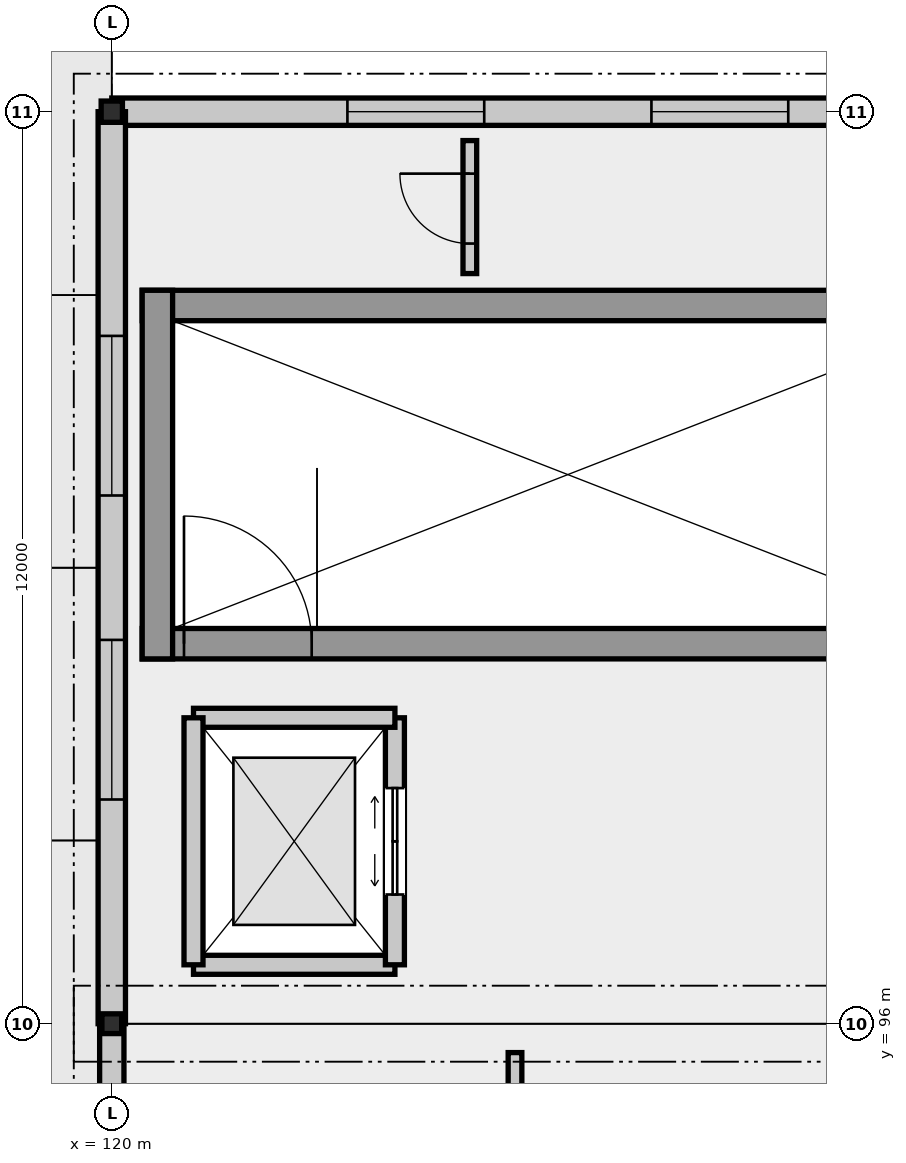
"""IFC4 building model, lengths in metres.
Left out: names, types, materials, properties, quantities, classifications, styles, units other than length and angle.
Written with IfcOpenShell. Run it as: python <this file> out.ifc"""

import sys

from ifc_helpers import new_model, si_unit, direction, frame, frame_2d, origin, origin_2d, place, context, subcontext, project, spatial, rectangle, i_section, extrude, element, fill, save


model = new_model("IFC4")
c1 = context("Model", 3, precision=1e-05, world=origin(), true_north=direction((0.0, 1.0)))
c2 = subcontext(c1, "Body", "Model", "MODEL_VIEW")
j1 = project(units=[si_unit("LENGTHUNIT", "METRE"), si_unit("PLANEANGLEUNIT", "RADIAN")], contexts=[c1])
p1 = place(None, origin())
s1 = spatial("IfcSite", under=j1, at=p1, CompositionType="ELEMENT")
p2 = place(p1, origin())
s2 = spatial("IfcBuilding", under=s1, at=p2, CompositionType="ELEMENT")
p3 = place(p2, frame((0.0, 0.0, 23.4)))
s3 = spatial("IfcBuildingStorey", under=s2, at=p3, CompositionType="ELEMENT", Elevation=23.4)
p4 = place(p3, frame((120.0, 96.0, 0.0), z_axis=(0.0, 0.0, 1.0), x_axis=(1.0, 0.0, 0.0)))
e1 = element("IfcColumn", 1, at=p4, inside=s3, PredefinedType="COLUMN", context=c2, shape_type="SweptSolid", body=[
    extrude(i_section(OverallWidth=0.26, OverallDepth=0.26, WebThickness=0.01, FlangeThickness=0.018, FilletRadius=0.024, at=origin_2d()), origin(), (0.0, 0.0, 1.0), 4.8),
])
p5 = place(p3, frame((120.0, 108.0, 0.0), z_axis=(0.0, 0.0, 1.0), x_axis=(1.0, 0.0, 0.0)))
e2 = element("IfcColumn", 2, at=p5, inside=s3, PredefinedType="COLUMN", context=c2, shape_type="SweptSolid", body=[
    extrude(i_section(OverallWidth=0.28, OverallDepth=0.28, WebThickness=0.01, FlangeThickness=0.018, FilletRadius=0.024, at=origin_2d()), origin(), (0.0, 0.0, 1.0), 4.8),
])
p6 = place(p3, frame((120.0, 96.0, 0.0), z_axis=(0.0, 0.0, 1.0), x_axis=(0.0, -1.0, 0.0)))
e3 = element("IfcWall", 3, at=p6, inside=s3, PredefinedType="SOLIDWALL", context=c2, shape_type="SweptSolid", body=[
    extrude(rectangle(XDim=12.0, YDim=0.32, at=frame_2d((6.0, 0.0))), origin(), (0.0, 0.0, 1.0), 3.98),
])
p7 = place(p6, frame((3.175, 0.0, 0.95)))
e4 = element("IfcOpeningElement", 4, at=p7, cuts=e3, PredefinedType="OPENING", context=c2, shape_type="SweptSolid", body=[
    extrude(rectangle(XDim=1.65, YDim=2.1, at=frame_2d((0.825, 1.05))), frame((0.0, 0.17, 0.0), z_axis=(0.0, -1.0, 0.0), x_axis=(1.0, 0.0, 0.0)), (0.0, 0.0, 1.0), 0.34),
])
p8 = place(p6, frame((7.175, 0.0, 0.95)))
e5 = element("IfcOpeningElement", 5, at=p8, cuts=e3, PredefinedType="OPENING", context=c2, shape_type="SweptSolid", body=[
    extrude(rectangle(XDim=1.65, YDim=2.1, at=frame_2d((0.825, 1.05))), frame((0.0, 0.17, 0.0), z_axis=(0.0, -1.0, 0.0), x_axis=(1.0, 0.0, 0.0)), (0.0, 0.0, 1.0), 0.34),
])
p9 = place(p3, frame((132.0, 108.0, 0.0), z_axis=(0.0, 0.0, 1.0), x_axis=(-1.0, 0.0, 0.0)))
e6 = element("IfcWall", 6, at=p9, inside=s3, PredefinedType="SOLIDWALL", context=c2, shape_type="SweptSolid", body=[
    extrude(rectangle(XDim=12.0, YDim=0.36, at=frame_2d((6.0, 0.0))), origin(), (0.0, 0.0, 1.0), 3.98),
])
p10 = place(p9, frame((3.1, 0.0, 0.95)))
e7 = element("IfcOpeningElement", 7, at=p10, cuts=e6, PredefinedType="OPENING", context=c2, shape_type="SweptSolid", body=[
    extrude(rectangle(XDim=1.8, YDim=2.1, at=frame_2d((0.9, 1.05))), frame((0.0, 0.19, 0.0), z_axis=(0.0, -1.0, 0.0), x_axis=(1.0, 0.0, 0.0)), (0.0, 0.0, 1.0), 0.38),
])
p11 = place(p9, frame((7.1, 0.0, 0.95)))
e8 = element("IfcOpeningElement", 8, at=p11, cuts=e6, PredefinedType="OPENING", context=c2, shape_type="SweptSolid", body=[
    extrude(rectangle(XDim=1.8, YDim=2.1, at=frame_2d((0.9, 1.05))), frame((0.0, 0.19, 0.0), z_axis=(0.0, -1.0, 0.0), x_axis=(1.0, 0.0, 0.0)), (0.0, 0.0, 1.0), 0.38),
])
p12 = place(p3, frame((120.0, 108.0, 0.0), z_axis=(0.0, 0.0, 1.0), x_axis=(0.0, -1.0, 0.0)))
e9 = element("IfcWall", 9, at=p12, inside=s3, PredefinedType="SOLIDWALL", context=c2, shape_type="SweptSolid", body=[
    extrude(rectangle(XDim=12.0, YDim=0.36, at=frame_2d((6.0, 0.0))), origin(), (0.0, 0.0, 1.0), 3.98),
])
p13 = place(p12, frame((2.95, 0.0, 0.95)))
e10 = element("IfcOpeningElement", 10, at=p13, cuts=e9, PredefinedType="OPENING", context=c2, shape_type="SweptSolid", body=[
    extrude(rectangle(XDim=2.1, YDim=2.1, at=frame_2d((1.05, 1.05))), frame((0.0, 0.19, 0.0), z_axis=(0.0, -1.0, 0.0), x_axis=(1.0, 0.0, 0.0)), (0.0, 0.0, 1.0), 0.38),
])
p14 = place(p12, frame((6.95, 0.0, 0.95)))
e11 = element("IfcOpeningElement", 11, at=p14, cuts=e9, PredefinedType="OPENING", context=c2, shape_type="SweptSolid", body=[
    extrude(rectangle(XDim=2.1, YDim=2.1, at=frame_2d((1.05, 1.05))), frame((0.0, 0.19, 0.0), z_axis=(0.0, -1.0, 0.0), x_axis=(1.0, 0.0, 0.0)), (0.0, 0.0, 1.0), 0.38),
])
p15 = place(p3, frame((120.4, 101.0, 0.0), z_axis=(0.0, 0.0, 1.0), x_axis=(1.0, 0.0, 0.0)))
e12 = element("IfcWall", 12, at=p15, inside=s3, PredefinedType="SHEAR", context=c2, shape_type="SweptSolid", body=[
    extrude(rectangle(XDim=11.2, YDim=0.4, at=frame_2d((5.6, 0.0))), origin(), (0.0, 0.0, 1.0), 4.56),
])
p16 = place(p15, frame((0.55, 0.0, 0.0)))
e13 = element("IfcOpeningElement", 13, at=p16, cuts=e12, PredefinedType="OPENING", context=c2, shape_type="SweptSolid", body=[
    extrude(rectangle(XDim=1.68, YDim=2.35, at=frame_2d((0.84, 1.175))), frame((0.0, 0.21, 0.0), z_axis=(0.0, -1.0, 0.0), x_axis=(1.0, 0.0, 0.0)), (0.0, 0.0, 1.0), 0.42),
])
p17 = place(p3, frame((131.6, 105.45, 0.0), z_axis=(0.0, 0.0, 1.0), x_axis=(-1.0, 0.0, 0.0)))
e14 = element("IfcWall", 14, at=p17, inside=s3, PredefinedType="SHEAR", context=c2, shape_type="SweptSolid", body=[
    extrude(rectangle(XDim=11.2, YDim=0.4, at=frame_2d((5.6, 0.0))), origin(), (0.0, 0.0, 1.0), 4.56),
])
p18 = place(p3, frame((120.6, 105.65, 0.0), z_axis=(0.0, 0.0, 1.0), x_axis=(0.0, -1.0, 0.0)))
e15 = element("IfcWall", 15, at=p18, inside=s3, PredefinedType="SHEAR", context=c2, shape_type="SweptSolid", body=[
    extrude(rectangle(XDim=4.85, YDim=0.4, at=frame_2d((2.425, 0.0))), origin(), (0.0, 0.0, 1.0), 4.56),
])
p19 = place(p3, frame((121.075, 96.775, 0.0), z_axis=(0.0, 0.0, 1.0), x_axis=(1.0, 0.0, 0.0)))
e16 = element("IfcWall", 16, at=p19, inside=s3, PredefinedType="SOLIDWALL", context=c2, shape_type="SweptSolid", body=[
    extrude(rectangle(XDim=2.65, YDim=0.25, at=frame_2d((1.325, 0.0))), origin(), (0.0, 0.0, 1.0), 4.54),
])
p20 = place(p3, frame((123.725, 96.775, 0.0), z_axis=(0.0, 0.0, 1.0), x_axis=(0.0, 1.0, 0.0)))
e17 = element("IfcWall", 17, at=p20, inside=s3, PredefinedType="SOLIDWALL", context=c2, shape_type="SweptSolid", body=[
    extrude(rectangle(XDim=3.25, YDim=0.25, at=frame_2d((1.625, 0.0))), origin(), (0.0, 0.0, 1.0), 4.54),
])
p21 = place(p20, frame((0.925, 0.0, 0.0)))
e18 = element("IfcOpeningElement", 18, at=p21, cuts=e17, PredefinedType="OPENING", context=c2, shape_type="SweptSolid", body=[
    extrude(rectangle(XDim=1.4, YDim=2.3, at=frame_2d((0.7, 1.15))), frame((0.0, 0.135, 0.0), z_axis=(0.0, -1.0, 0.0), x_axis=(1.0, 0.0, 0.0)), (0.0, 0.0, 1.0), 0.27),
])
p22 = place(p3, frame((123.725, 100.025, 0.0), z_axis=(0.0, 0.0, 1.0), x_axis=(-1.0, 0.0, 0.0)))
e19 = element("IfcWall", 19, at=p22, inside=s3, PredefinedType="SOLIDWALL", context=c2, shape_type="SweptSolid", body=[
    extrude(rectangle(XDim=2.65, YDim=0.25, at=frame_2d((1.325, 0.0))), origin(), (0.0, 0.0, 1.0), 4.54),
])
p23 = place(p3, frame((121.075, 100.025, 0.0), z_axis=(0.0, 0.0, 1.0), x_axis=(0.0, -1.0, 0.0)))
e20 = element("IfcWall", 20, at=p23, inside=s3, PredefinedType="SOLIDWALL", context=c2, shape_type="SweptSolid", body=[
    extrude(rectangle(XDim=3.25, YDim=0.25, at=frame_2d((1.625, 0.0))), origin(), (0.0, 0.0, 1.0), 4.54),
])
p24 = place(p3, frame((125.305, 93.87, 0.0), z_axis=(0.0, 0.0, 1.0), x_axis=(0.0, 1.0, 0.0)))
e21 = element("IfcWall", 21, at=p24, inside=s3, PredefinedType="PARTITIONING", context=c2, shape_type="SweptSolid", body=[
    extrude(rectangle(XDim=1.75, YDim=0.18, at=frame_2d((0.875, 0.0))), origin(), (0.0, 0.0, 1.0), 4.14),
])
p25 = place(p24, frame((0.395, 0.0, 0.0)))
e22 = element("IfcOpeningElement", 22, at=p25, cuts=e21, PredefinedType="OPENING", context=c2, shape_type="SweptSolid", body=[
    extrude(rectangle(XDim=0.92, YDim=2.15, at=frame_2d((0.46, 1.075))), frame((0.0, 0.1, 0.0), z_axis=(0.0, -1.0, 0.0), x_axis=(1.0, 0.0, 0.0)), (0.0, 0.0, 1.0), 0.2),
])
p26 = place(p3, frame((124.711, 105.87, 0.0), z_axis=(0.0, 0.0, 1.0), x_axis=(0.0, 1.0, 0.0)))
e23 = element("IfcWall", 23, at=p26, inside=s3, PredefinedType="PARTITIONING", context=c2, shape_type="SweptSolid", body=[
    extrude(rectangle(XDim=1.75, YDim=0.18, at=frame_2d((0.875, 0.0))), origin(), (0.0, 0.0, 1.0), 4.54),
])
p27 = place(p26, frame((0.395, 0.0, 0.0)))
e24 = element("IfcOpeningElement", 24, at=p27, cuts=e23, PredefinedType="OPENING", context=c2, shape_type="SweptSolid", body=[
    extrude(rectangle(XDim=0.92, YDim=2.15, at=frame_2d((0.46, 1.075))), frame((0.0, 0.1, 0.0), z_axis=(0.0, -1.0, 0.0), x_axis=(1.0, 0.0, 0.0)), (0.0, 0.0, 1.0), 0.2),
])
p28 = place(p10, origin())
e25 = element("IfcWindow", 25, at=p28, inside=s3, PartitioningType="SINGLE_PANEL", PredefinedType="WINDOW", context=c2, shape_type="SweptSolid", body=[
    extrude(rectangle(XDim=1.8, YDim=2.1, at=frame_2d((0.9, 1.05))), frame((0.0, 0.03, 0.0), z_axis=(0.0, -1.0, 0.0), x_axis=(1.0, 0.0, 0.0)), (0.0, 0.0, 1.0), 0.06),
])
fill(e7, e25)
p29 = place(p11, origin())
e26 = element("IfcWindow", 26, at=p29, inside=s3, PartitioningType="SINGLE_PANEL", PredefinedType="WINDOW", context=c2, shape_type="SweptSolid", body=[
    extrude(rectangle(XDim=1.8, YDim=2.1, at=frame_2d((0.9, 1.05))), frame((0.0, 0.03, 0.0), z_axis=(0.0, -1.0, 0.0), x_axis=(1.0, 0.0, 0.0)), (0.0, 0.0, 1.0), 0.06),
])
fill(e8, e26)
p30 = place(p13, origin())
e27 = element("IfcWindow", 27, at=p30, inside=s3, PartitioningType="SINGLE_PANEL", PredefinedType="WINDOW", context=c2, shape_type="SweptSolid", body=[
    extrude(rectangle(XDim=2.1, YDim=2.1, at=frame_2d((1.05, 1.05))), frame((0.0, 0.03, 0.0), z_axis=(0.0, -1.0, 0.0), x_axis=(1.0, 0.0, 0.0)), (0.0, 0.0, 1.0), 0.06),
])
fill(e10, e27)
p31 = place(p14, origin())
e28 = element("IfcWindow", 28, at=p31, inside=s3, PartitioningType="SINGLE_PANEL", PredefinedType="WINDOW", context=c2, shape_type="SweptSolid", body=[
    extrude(rectangle(XDim=2.1, YDim=2.1, at=frame_2d((1.05, 1.05))), frame((0.0, 0.03, 0.0), z_axis=(0.0, -1.0, 0.0), x_axis=(1.0, 0.0, 0.0)), (0.0, 0.0, 1.0), 0.06),
])
fill(e11, e28)
p32 = place(p16, origin())
e29 = element("IfcDoor", 29, at=p32, inside=s3, OperationType="DOUBLE_DOOR_SINGLE_SWING", PredefinedType="DOOR", context=c2, shape_type="SweptSolid", body=[
    extrude(rectangle(XDim=1.68, YDim=2.35, at=frame_2d((0.84, 1.175))), frame((0.0, 0.025, 0.0), z_axis=(0.0, -1.0, 0.0), x_axis=(1.0, 0.0, 0.0)), (0.0, 0.0, 1.0), 0.05),
])
fill(e13, e29)
p33 = place(p21, origin())
e30 = element("IfcDoor", 30, at=p33, inside=s3, OperationType="SLIDING_TO_LEFT", PredefinedType="DOOR", context=c2, shape_type="SweptSolid", body=[
    extrude(rectangle(XDim=1.4, YDim=2.3, at=frame_2d((0.7, 1.15))), frame((0.0, 0.025, 0.0), z_axis=(0.0, -1.0, 0.0), x_axis=(1.0, 0.0, 0.0)), (0.0, 0.0, 1.0), 0.05),
])
fill(e18, e30)
p34 = place(p27, origin())
e31 = element("IfcDoor", 31, at=p34, inside=s3, OperationType="SINGLE_SWING_RIGHT", PredefinedType="DOOR", context=c2, shape_type="SweptSolid", body=[
    extrude(rectangle(XDim=0.92, YDim=2.15, at=frame_2d((0.46, 1.075))), frame((0.0, 0.025, 0.0), z_axis=(0.0, -1.0, 0.0), x_axis=(1.0, 0.0, 0.0)), (0.0, 0.0, 1.0), 0.05),
])
fill(e24, e31)
save(model, sys.argv[1])
